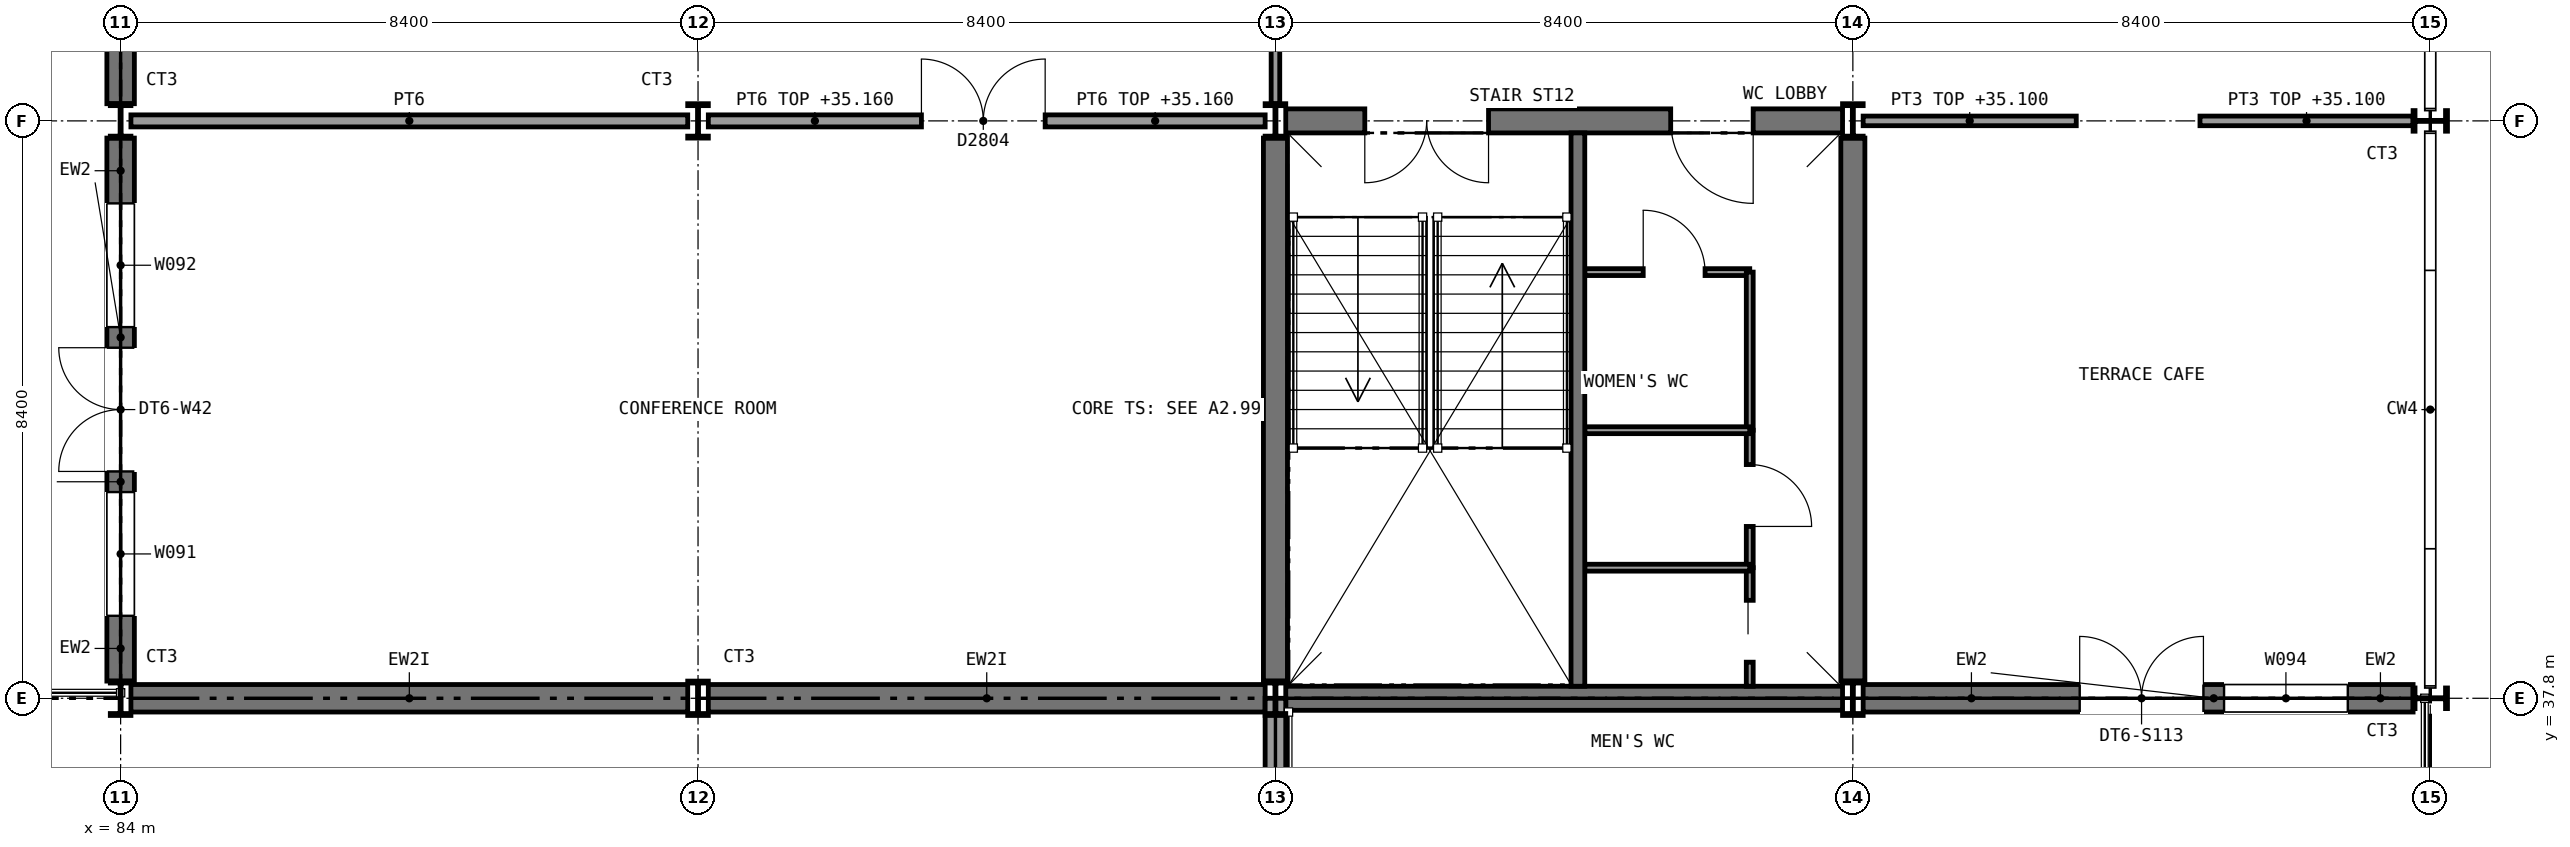
"""IFC4 building model, lengths in metres.
Left out: names, types, materials, properties, quantities, classifications, styles, units other than length and angle.
Written with IfcOpenShell. Run it as: python <this file> out.ifc"""

import sys

from ifc_helpers import new_model, si_unit, direction, frame, frame_2d, origin, origin_2d, place, context, subcontext, project, spatial, polyline, rectangle, i_section, outline, extrude, element, fill, save


model = new_model("IFC4")
c1 = context("Model", 3, precision=1e-05, world=origin(), true_north=direction((0.0, 1.0)))
c2 = subcontext(c1, "Body", "Model", "MODEL_VIEW")
j1 = project(units=[si_unit("LENGTHUNIT", "METRE"), si_unit("PLANEANGLEUNIT", "RADIAN")], contexts=[c1])
p1 = place(None, origin())
s1 = spatial("IfcSite", under=j1, at=p1, CompositionType="ELEMENT")
p2 = place(p1, origin())
s2 = spatial("IfcBuilding", under=s1, at=p2, CompositionType="ELEMENT")
p3 = place(p2, frame((0.0, 0.0, 31.2)))
s3 = spatial("IfcBuildingStorey", under=s2, at=p3, CompositionType="ELEMENT", Elevation=31.2)
p4 = place(p3, frame((100.95, 37.8, 0.0), z_axis=(0.0, 0.0, 1.0), x_axis=(1.0, 0.0, 0.0)))
e1 = element("IfcWall", 1, at=p4, inside=s3, PredefinedType="SHEAR", context=c2, shape_type="SweptSolid", body=[
    extrude(rectangle(XDim=8.1, YDim=0.35, at=frame_2d((4.05, 0.0))), origin(), (0.0, 0.0, 1.0), 4.25),
])
p5 = place(p3, frame((100.95, 46.2, 0.0), z_axis=(0.0, 0.0, 1.0), x_axis=(1.0, 0.0, 0.0)))
e2 = element("IfcWall", 2, at=p5, inside=s3, PredefinedType="SHEAR", context=c2, shape_type="SweptSolid", body=[
    extrude(rectangle(XDim=8.1, YDim=0.35, at=frame_2d((4.05, 0.0))), origin(), (0.0, 0.0, 1.0), 4.25),
])
p6 = place(p5, frame((1.15, 0.0, 0.0)))
e3 = element("IfcOpeningElement", 3, at=p6, cuts=e2, PredefinedType="OPENING", context=c2, shape_type="SweptSolid", body=[
    extrude(rectangle(XDim=1.8, YDim=2.1, at=frame_2d((0.9, 1.05))), frame((0.0, 0.185, 0.0), z_axis=(0.0, -1.0, 0.0), x_axis=(1.0, 0.0, 0.0)), (0.0, 0.0, 1.0), 0.37),
])
p7 = place(p5, frame((5.6, 0.0, 0.0)))
e4 = element("IfcOpeningElement", 4, at=p7, cuts=e2, PredefinedType="OPENING", context=c2, shape_type="SweptSolid", body=[
    extrude(rectangle(XDim=1.2, YDim=2.1, at=frame_2d((0.6, 1.05))), frame((0.0, 0.185, 0.0), z_axis=(0.0, -1.0, 0.0), x_axis=(1.0, 0.0, 0.0)), (0.0, 0.0, 1.0), 0.37),
])
for number, where, z_axis, x_axis in (
    (5, (100.8, 38.05, 0.0), (0.0, 0.0, 1.0), (0.0, 1.0, 0.0)),
    (6, (109.2, 38.05, 0.0), (0.0, 0.0, 1.0), (0.0, 1.0, 0.0)),
):
    element("IfcWall", number, at=place(p3, frame(where, z_axis=z_axis, x_axis=x_axis)), inside=s3, PredefinedType="SHEAR", context=c2, shape_type="SweptSolid", body=[
        extrude(rectangle(XDim=7.9, YDim=0.35, at=frame_2d((3.95, 0.0))), origin(), (0.0, 0.0, 1.0), 4.25),
    ])
for number, where, z_axis, x_axis in (
    (7, (84.0, 37.8, 0.0), (0.0, 0.0, 1.0), (1.0, 0.0, 0.0)),
    (8, (84.0, 46.2, 0.0), (0.0, 0.0, 1.0), (1.0, 0.0, 0.0)),
    (9, (92.4, 37.8, 0.0), (0.0, 0.0, 1.0), (1.0, 0.0, 0.0)),
    (10, (92.4, 46.2, 0.0), (0.0, 0.0, 1.0), (1.0, 0.0, 0.0)),
    (11, (100.8, 37.8, 0.0), (0.0, 0.0, 1.0), (1.0, 0.0, 0.0)),
    (12, (100.8, 46.2, 0.0), (0.0, 0.0, 1.0), (1.0, 0.0, 0.0)),
    (13, (109.2, 37.8, 0.0), (0.0, 0.0, 1.0), (1.0, 0.0, 0.0)),
    (14, (109.2, 46.2, 0.0), (0.0, 0.0, 1.0), (1.0, 0.0, 0.0)),
    (15, (117.6, 37.8, 0.0), (0.0, 0.0, 1.0), (0.0, 1.0, 0.0)),
    (16, (117.6, 46.2, 0.0), (0.0, 0.0, 1.0), (0.0, 1.0, 0.0)),
):
    element("IfcColumn", number, at=place(p3, frame(where, z_axis=z_axis, x_axis=x_axis)), inside=s3, PredefinedType="COLUMN", context=c2, shape_type="SweptSolid", body=[
        extrude(i_section(OverallWidth=0.3, OverallDepth=0.5, WebThickness=0.014, FlangeThickness=0.028, FilletRadius=0.027, at=origin_2d()), origin(), (0.0, 0.0, 1.0), 4.4),
    ])
p8 = place(p3, frame((105.3, 44.0, 0.0), z_axis=(0.0, 0.0, 1.0), x_axis=(1.0, 0.0, 0.0)))
e17 = element("IfcWall", 17, at=p8, inside=s3, PredefinedType="PARTITIONING", context=c2, shape_type="SweptSolid", body=[
    extrude(rectangle(XDim=2.4, YDim=0.1, at=frame_2d((1.2, 0.0))), origin(), (0.0, 0.0, 1.0), 4.18),
])
p9 = place(p8, frame((0.85, 0.0, 0.0)))
e18 = element("IfcOpeningElement", 18, at=p9, cuts=e17, PredefinedType="OPENING", context=c2, shape_type="SweptSolid", body=[
    extrude(rectangle(XDim=0.9, YDim=2.1, at=frame_2d((0.45, 1.05))), frame((0.0, 0.06, 0.0), z_axis=(0.0, -1.0, 0.0), x_axis=(1.0, 0.0, 0.0)), (0.0, 0.0, 1.0), 0.12),
])
p10 = place(p3, frame((107.7, 41.7, 0.0), z_axis=(0.0, 0.0, 1.0), x_axis=(0.0, 1.0, 0.0)))
e19 = element("IfcWall", 19, at=p10, inside=s3, PredefinedType="PARTITIONING", context=c2, shape_type="SweptSolid", body=[
    extrude(rectangle(XDim=2.3, YDim=0.1, at=frame_2d((1.15, 0.0))), origin(), (0.0, 0.0, 1.0), 4.18),
])
p11 = place(p3, frame((107.7, 39.7, 0.0), z_axis=(0.0, 0.0, 1.0), x_axis=(0.0, 1.0, 0.0)))
e20 = element("IfcWall", 20, at=p11, inside=s3, PredefinedType="PARTITIONING", context=c2, shape_type="SweptSolid", body=[
    extrude(rectangle(XDim=2.0, YDim=0.1, at=frame_2d((1.0, 0.0))), origin(), (0.0, 0.0, 1.0), 4.18),
])
p12 = place(p11, frame((0.6, 0.0, 0.0)))
e21 = element("IfcOpeningElement", 21, at=p12, cuts=e20, PredefinedType="OPENING", context=c2, shape_type="SweptSolid", body=[
    extrude(rectangle(XDim=0.9, YDim=2.1, at=frame_2d((0.45, 1.05))), frame((0.0, 0.06, 0.0), z_axis=(0.0, -1.0, 0.0), x_axis=(1.0, 0.0, 0.0)), (0.0, 0.0, 1.0), 0.12),
])
p13 = place(p3, frame((107.7, 37.975, 0.0), z_axis=(0.0, 0.0, 1.0), x_axis=(0.0, 1.0, 0.0)))
e22 = element("IfcWall", 22, at=p13, inside=s3, PredefinedType="PARTITIONING", context=c2, shape_type="SweptSolid", body=[
    extrude(rectangle(XDim=1.725, YDim=0.1, at=frame_2d((0.862, 0.0))), origin(), (0.0, 0.0, 1.0), 4.18),
])
p14 = place(p13, frame((0.35, 0.0, 0.0)))
e23 = element("IfcOpeningElement", 23, at=p14, cuts=e22, PredefinedType="OPENING", context=c2, shape_type="SweptSolid", body=[
    extrude(rectangle(XDim=0.9, YDim=2.1, at=frame_2d((0.45, 1.05))), frame((0.0, 0.06, 0.0), z_axis=(0.0, -1.0, 0.0), x_axis=(1.0, 0.0, 0.0)), (0.0, 0.0, 1.0), 0.12),
])
for number, where, z_axis, x_axis in (
    (24, (105.3, 41.7, 0.0), (0.0, 0.0, 1.0), (1.0, 0.0, 0.0)),
    (25, (105.3, 39.7, 0.0), (0.0, 0.0, 1.0), (1.0, 0.0, 0.0)),
):
    element("IfcWall", number, at=place(p3, frame(where, z_axis=z_axis, x_axis=x_axis)), inside=s3, PredefinedType="PARTITIONING", context=c2, shape_type="SweptSolid", body=[
        extrude(rectangle(XDim=2.4, YDim=0.1, at=frame_2d((1.2, 0.0))), origin(), (0.0, 0.0, 1.0), 4.18),
    ])
p15 = place(p3, frame((84.15, 46.2, 0.0), z_axis=(0.0, 0.0, 1.0), x_axis=(1.0, 0.0, 0.0)))
e26 = element("IfcWall", 26, at=p15, inside=s3, PredefinedType="PARTITIONING", context=c2, shape_type="SweptSolid", body=[
    extrude(rectangle(XDim=8.1, YDim=0.175, at=frame_2d((4.05, 0.0))), origin(), (0.0, 0.0, 1.0), 3.9),
])
p16 = place(p3, frame((92.55, 46.2, 0.0), z_axis=(0.0, 0.0, 1.0), x_axis=(1.0, 0.0, 0.0)))
e27 = element("IfcWall", 27, at=p16, inside=s3, PredefinedType="PARTITIONING", context=c2, shape_type="SweptSolid", body=[
    extrude(rectangle(XDim=8.1, YDim=0.175, at=frame_2d((4.05, 0.0))), origin(), (0.0, 0.0, 1.0), 3.96),
])
p17 = place(p16, frame((3.1, 0.0, 0.0)))
e28 = element("IfcOpeningElement", 28, at=p17, cuts=e27, PredefinedType="OPENING", context=c2, shape_type="SweptSolid", body=[
    extrude(rectangle(XDim=1.8, YDim=2.1, at=frame_2d((0.9, 1.05))), frame((0.0, 0.098, 0.0), z_axis=(0.0, -1.0, 0.0), x_axis=(1.0, 0.0, 0.0)), (0.0, 0.0, 1.0), 0.195),
])
for number, where, z_axis, x_axis in (
    (29, (109.35, 46.2, 0.0), (0.0, 0.0, 1.0), (1.0, 0.0, 0.0)),
    (30, (114.25, 46.2, 0.0), (0.0, 0.0, 1.0), (1.0, 0.0, 0.0)),
):
    element("IfcWall", number, at=place(p3, frame(where, z_axis=z_axis, x_axis=x_axis)), inside=s3, PredefinedType="PARTITIONING", context=c2, shape_type="SweptSolid", body=[
        extrude(rectangle(XDim=3.1, YDim=0.14, at=frame_2d((1.55, 0.0))), origin(), (0.0, 0.0, 1.0), 3.9),
    ])
p18 = place(p3, frame((100.8, 46.45, 0.0), z_axis=(0.0, 0.0, 1.0), x_axis=(0.0, 1.0, 0.0)))
e31 = element("IfcWall", 31, at=p18, inside=s3, PredefinedType="PARTITIONING", context=c2, shape_type="SweptSolid", body=[
    extrude(rectangle(XDim=3.1, YDim=0.125, at=frame_2d((1.55, 0.0))), origin(), (0.0, 0.0, 1.0), 3.9),
])
p19 = place(p3, frame((84.0, 38.05, 0.0), z_axis=(0.0, 0.0, 1.0), x_axis=(0.0, 1.0, 0.0)))
e32 = element("IfcWall", 32, at=p19, inside=s3, PredefinedType="STANDARD", context=c2, shape_type="SweptSolid", body=[
    extrude(rectangle(XDim=7.9, YDim=0.4, at=frame_2d((3.95, 0.0))), origin(), (0.0, 0.0, 1.0), 4.25),
])
p20 = place(p19, frame((0.95, 0.0, 0.9)))
e33 = element("IfcOpeningElement", 33, at=p20, cuts=e32, PredefinedType="OPENING", context=c2, shape_type="SweptSolid", body=[
    extrude(rectangle(XDim=1.8, YDim=2.4, at=frame_2d((0.9, 1.2))), frame((0.0, 0.21, 0.0), z_axis=(0.0, -1.0, 0.0), x_axis=(1.0, 0.0, 0.0)), (0.0, 0.0, 1.0), 0.42),
])
p21 = place(p19, frame((5.15, 0.0, 0.9)))
e34 = element("IfcOpeningElement", 34, at=p21, cuts=e32, PredefinedType="OPENING", context=c2, shape_type="SweptSolid", body=[
    extrude(rectangle(XDim=1.8, YDim=2.4, at=frame_2d((0.9, 1.2))), frame((0.0, 0.21, 0.0), z_axis=(0.0, -1.0, 0.0), x_axis=(1.0, 0.0, 0.0)), (0.0, 0.0, 1.0), 0.42),
])
p22 = place(p19, frame((3.05, 0.0, 0.0)))
e35 = element("IfcOpeningElement", 35, at=p22, cuts=e32, PredefinedType="OPENING", context=c2, shape_type="SweptSolid", body=[
    extrude(rectangle(XDim=1.8, YDim=2.4, at=frame_2d((0.9, 1.2))), frame((0.0, 0.21, 0.0), z_axis=(0.0, -1.0, 0.0), x_axis=(1.0, 0.0, 0.0)), (0.0, 0.0, 1.0), 0.42),
])
p23 = place(p3, frame((84.0, 46.45, 0.0), z_axis=(0.0, 0.0, 1.0), x_axis=(0.0, 1.0, 0.0)))
e36 = element("IfcWall", 36, at=p23, inside=s3, PredefinedType="STANDARD", context=c2, shape_type="SweptSolid", body=[
    extrude(rectangle(XDim=7.9, YDim=0.4, at=frame_2d((3.95, 0.0))), origin(), (0.0, 0.0, 1.0), 4.25),
])
p24 = place(p23, frame((5.15, 0.0, 0.9)))
e37 = element("IfcOpeningElement", 37, at=p24, cuts=e36, PredefinedType="OPENING", context=c2, shape_type="SweptSolid", body=[
    extrude(rectangle(XDim=1.8, YDim=2.4, at=frame_2d((0.9, 1.2))), frame((0.0, 0.21, 0.0), z_axis=(0.0, -1.0, 0.0), x_axis=(1.0, 0.0, 0.0)), (0.0, 0.0, 1.0), 0.42),
])
p25 = place(p23, frame((3.05, 0.0, 0.0)))
e38 = element("IfcOpeningElement", 38, at=p25, cuts=e36, PredefinedType="OPENING", context=c2, shape_type="SweptSolid", body=[
    extrude(rectangle(XDim=1.8, YDim=2.4, at=frame_2d((0.9, 1.2))), frame((0.0, 0.21, 0.0), z_axis=(0.0, -1.0, 0.0), x_axis=(1.0, 0.0, 0.0)), (0.0, 0.0, 1.0), 0.42),
])
p26 = place(p3, frame((84.15, 37.8, 0.0), z_axis=(0.0, 0.0, 1.0), x_axis=(1.0, 0.0, 0.0)))
e39 = element("IfcWall", 39, at=p26, inside=s3, PredefinedType="STANDARD", context=c2, shape_type="SweptSolid", body=[
    extrude(rectangle(XDim=8.1, YDim=0.4, at=frame_2d((4.05, 0.0))), origin(), (0.0, 0.0, 1.0), 4.25),
])
p27 = place(p3, frame((92.55, 37.8, 0.0), z_axis=(0.0, 0.0, 1.0), x_axis=(1.0, 0.0, 0.0)))
e40 = element("IfcWall", 40, at=p27, inside=s3, PredefinedType="STANDARD", context=c2, shape_type="SweptSolid", body=[
    extrude(rectangle(XDim=8.1, YDim=0.4, at=frame_2d((4.05, 0.0))), origin(), (0.0, 0.0, 1.0), 4.25),
])
p28 = place(p3, frame((109.35, 37.8, 0.0), z_axis=(0.0, 0.0, 1.0), x_axis=(1.0, 0.0, 0.0)))
e41 = element("IfcWall", 41, at=p28, inside=s3, PredefinedType="STANDARD", context=c2, shape_type="SweptSolid", body=[
    extrude(rectangle(XDim=8.0, YDim=0.4, at=frame_2d((4.0, 0.0))), origin(), (0.0, 0.0, 1.0), 4.25),
])
p29 = place(p28, frame((5.25, 0.0, 0.9)))
e42 = element("IfcOpeningElement", 42, at=p29, cuts=e41, PredefinedType="OPENING", context=c2, shape_type="SweptSolid", body=[
    extrude(rectangle(XDim=1.8, YDim=2.4, at=frame_2d((0.9, 1.2))), frame((0.0, 0.21, 0.0), z_axis=(0.0, -1.0, 0.0), x_axis=(1.0, 0.0, 0.0)), (0.0, 0.0, 1.0), 0.42),
])
p30 = place(p28, frame((3.15, 0.0, 0.0)))
e43 = element("IfcOpeningElement", 43, at=p30, cuts=e41, PredefinedType="OPENING", context=c2, shape_type="SweptSolid", body=[
    extrude(rectangle(XDim=1.8, YDim=2.4, at=frame_2d((0.9, 1.2))), frame((0.0, 0.21, 0.0), z_axis=(0.0, -1.0, 0.0), x_axis=(1.0, 0.0, 0.0)), (0.0, 0.0, 1.0), 0.42),
])
p31 = place(p3, frame((100.8, 25.2, 0.0), z_axis=(0.0, 0.0, 1.0), x_axis=(0.0, 1.0, 0.0)))
e44 = element("IfcWall", 44, at=p31, inside=s3, PredefinedType="STANDARD", context=c2, shape_type="SweptSolid", body=[
    extrude(outline(polyline([(0.0, 0.0), (12.6, 0.0), (12.6, 0.0), (11.119, 2.208), (8.907, 3.682), (6.3, 4.2), (3.693, 3.682), (1.481, 2.208), (0.0, 0.0), (0.0, 0.0)])), frame((0.0, 0.15, 0.0), z_axis=(0.0, -1.0, 0.0), x_axis=(1.0, 0.0, 0.0)), (0.0, 0.0, 1.0), 0.3),
])
p32 = place(p3, frame((105.2, 37.975, 0.0), z_axis=(0.0, 0.0, 1.0), x_axis=(0.0, 1.0, 0.0)))
e45 = element("IfcWall", 45, at=p32, inside=s3, PredefinedType="SHEAR", context=c2, shape_type="SweptSolid", body=[
    extrude(rectangle(XDim=8.05, YDim=0.2, at=frame_2d((4.025, 0.0))), origin(), (0.0, 0.0, 1.0), 4.25),
])
p33 = place(p9, origin())
e46 = element("IfcDoor", 46, at=p33, inside=s3, OperationType="SINGLE_SWING_LEFT", PredefinedType="DOOR", context=c2, shape_type="SweptSolid", body=[
    extrude(rectangle(XDim=0.9, YDim=2.1, at=frame_2d((0.45, 1.05))), frame((0.0, 0.025, 0.0), z_axis=(0.0, -1.0, 0.0), x_axis=(1.0, 0.0, 0.0)), (0.0, 0.0, 1.0), 0.05),
])
fill(e18, e46)
p34 = place(p12, frame((0.9, 0.0, 0.0), z_axis=(0.0, 0.0, 1.0), x_axis=(-1.0, 0.0, 0.0)))
e47 = element("IfcDoor", 47, at=p34, inside=s3, OperationType="SINGLE_SWING_RIGHT", PredefinedType="DOOR", context=c2, shape_type="SweptSolid", body=[
    extrude(rectangle(XDim=0.9, YDim=2.1, at=frame_2d((0.45, 1.05))), frame((0.0, 0.025, 0.0), z_axis=(0.0, -1.0, 0.0), x_axis=(1.0, 0.0, 0.0)), (0.0, 0.0, 1.0), 0.05),
])
fill(e21, e47)
p35 = place(p14, origin())
e48 = element("IfcDoor", 48, at=p35, inside=s3, OperationType="SLIDING_TO_RIGHT", PredefinedType="DOOR", context=c2, shape_type="SweptSolid", body=[
    extrude(rectangle(XDim=0.9, YDim=2.1, at=frame_2d((0.45, 1.05))), frame((0.0, 0.025, 0.0), z_axis=(0.0, -1.0, 0.0), x_axis=(1.0, 0.0, 0.0)), (0.0, 0.0, 1.0), 0.05),
])
fill(e23, e48)
p36 = place(p17, origin())
e49 = element("IfcDoor", 49, at=p36, inside=s3, OperationType="DOUBLE_DOOR_SINGLE_SWING", PredefinedType="DOOR", context=c2, shape_type="SweptSolid", body=[
    extrude(rectangle(XDim=1.8, YDim=2.1, at=frame_2d((0.9, 1.05))), frame((0.0, 0.025, 0.0), z_axis=(0.0, -1.0, 0.0), x_axis=(1.0, 0.0, 0.0)), (0.0, 0.0, 1.0), 0.05),
])
fill(e28, e49)
p37 = place(p20, origin())
e50 = element("IfcWindow", 50, at=p37, inside=s3, PartitioningType="SINGLE_PANEL", PredefinedType="WINDOW", context=c2, shape_type="SweptSolid", body=[
    extrude(rectangle(XDim=1.8, YDim=2.4, at=frame_2d((0.9, 1.2))), frame((0.0, 0.03, 0.0), z_axis=(0.0, -1.0, 0.0), x_axis=(1.0, 0.0, 0.0)), (0.0, 0.0, 1.0), 0.06),
])
fill(e33, e50)
p38 = place(p21, origin())
e51 = element("IfcWindow", 51, at=p38, inside=s3, PartitioningType="SINGLE_PANEL", PredefinedType="WINDOW", context=c2, shape_type="SweptSolid", body=[
    extrude(rectangle(XDim=1.8, YDim=2.4, at=frame_2d((0.9, 1.2))), frame((0.0, 0.03, 0.0), z_axis=(0.0, -1.0, 0.0), x_axis=(1.0, 0.0, 0.0)), (0.0, 0.0, 1.0), 0.06),
])
fill(e34, e51)
p39 = place(p29, origin())
e52 = element("IfcWindow", 52, at=p39, inside=s3, PartitioningType="SINGLE_PANEL", PredefinedType="WINDOW", context=c2, shape_type="SweptSolid", body=[
    extrude(rectangle(XDim=1.8, YDim=2.4, at=frame_2d((0.9, 1.2))), frame((0.0, 0.03, 0.0), z_axis=(0.0, -1.0, 0.0), x_axis=(1.0, 0.0, 0.0)), (0.0, 0.0, 1.0), 0.06),
])
fill(e42, e52)
p40 = place(p22, origin())
e53 = element("IfcDoor", 53, at=p40, inside=s3, OperationType="DOUBLE_DOOR_SINGLE_SWING", PredefinedType="DOOR", context=c2, shape_type="SweptSolid", body=[
    extrude(rectangle(XDim=1.8, YDim=2.4, at=frame_2d((0.9, 1.2))), frame((0.0, 0.025, 0.0), z_axis=(0.0, -1.0, 0.0), x_axis=(1.0, 0.0, 0.0)), (0.0, 0.0, 1.0), 0.05),
])
fill(e35, e53)
p41 = place(p30, origin())
e54 = element("IfcDoor", 54, at=p41, inside=s3, OperationType="DOUBLE_DOOR_SINGLE_SWING", PredefinedType="DOOR", context=c2, shape_type="SweptSolid", body=[
    extrude(rectangle(XDim=1.8, YDim=2.4, at=frame_2d((0.9, 1.2))), frame((0.0, 0.025, 0.0), z_axis=(0.0, -1.0, 0.0), x_axis=(1.0, 0.0, 0.0)), (0.0, 0.0, 1.0), 0.05),
])
fill(e43, e54)
p42 = place(p6, frame((1.8, 0.0, 0.0), z_axis=(0.0, 0.0, 1.0), x_axis=(-1.0, 0.0, 0.0)))
e55 = element("IfcDoor", 55, at=p42, inside=s3, OperationType="DOUBLE_DOOR_SINGLE_SWING", PredefinedType="DOOR", context=c2, shape_type="SweptSolid", body=[
    extrude(rectangle(XDim=1.8, YDim=2.1, at=frame_2d((0.9, 1.05))), frame((0.0, 0.025, 0.0), z_axis=(0.0, -1.0, 0.0), x_axis=(1.0, 0.0, 0.0)), (0.0, 0.0, 1.0), 0.05),
])
fill(e3, e55)
p43 = place(p7, frame((1.2, 0.0, 0.0), z_axis=(0.0, 0.0, 1.0), x_axis=(-1.0, 0.0, 0.0)))
e56 = element("IfcDoor", 56, at=p43, inside=s3, OperationType="SINGLE_SWING_LEFT", PredefinedType="DOOR", context=c2, shape_type="SweptSolid", body=[
    extrude(rectangle(XDim=1.2, YDim=2.1, at=frame_2d((0.6, 1.05))), frame((0.0, 0.025, 0.0), z_axis=(0.0, -1.0, 0.0), x_axis=(1.0, 0.0, 0.0)), (0.0, 0.0, 1.0), 0.05),
])
fill(e4, e56)
save(model, sys.argv[1])
